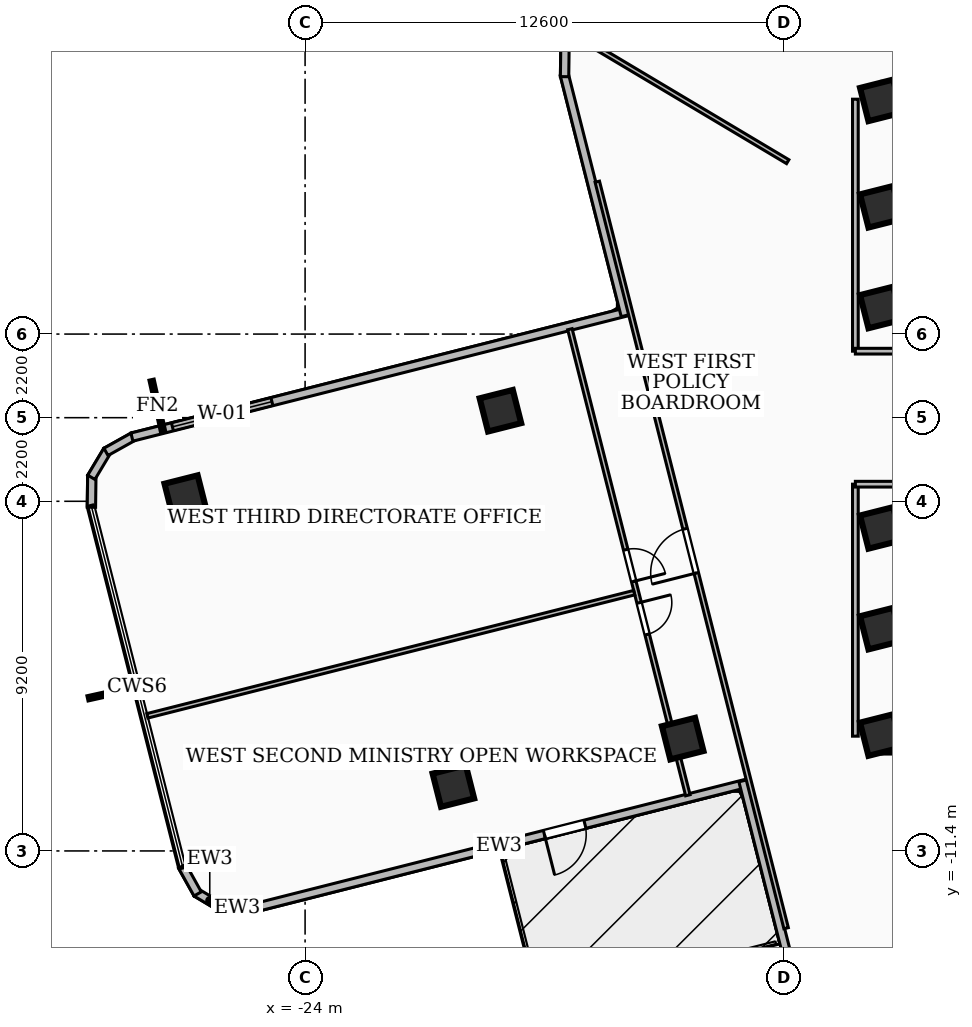
"""IFC4 building model, lengths in metres.
Left out: names, types, materials, properties, quantities, classifications, styles, units other than length and angle.
Written with IfcOpenShell. Run it as: python <this file> out.ifc"""

import sys

from ifc_helpers import new_model, si_unit, direction, frame, frame_2d, origin, origin_2d, place, context, subcontext, project, spatial, rectangle, extrude, element, fill, save


model = new_model("IFC4")
c1 = context("Model", 3, precision=1e-05, world=origin(), true_north=direction((0.0, 1.0)))
c2 = subcontext(c1, "Body", "Model", "MODEL_VIEW")
j1 = project(units=[si_unit("LENGTHUNIT", "METRE"), si_unit("PLANEANGLEUNIT", "RADIAN")], contexts=[c1])
p1 = place(None, origin())
s1 = spatial("IfcSite", under=j1, at=p1, CompositionType="ELEMENT")
p2 = place(p1, origin())
s2 = spatial("IfcBuilding", under=s1, at=p2, CompositionType="ELEMENT")
p3 = place(p2, frame((0.0, 0.0, 127.08)))
s3 = spatial("IfcBuildingStorey", under=s2, at=p3, CompositionType="ELEMENT", Elevation=127.08)
for number, where, z_axis, x_axis in (
    (1, (-8.78, 8.56, 0.0), (0.0, 0.0, 1.0), (1.0, 0.0, 0.0)),
    (2, (8.78, -8.56, 0.0), (0.0, 0.0, 1.0), (-1.0, 0.0, 0.0)),
):
    element("IfcWall", number, at=place(p3, frame(where, z_axis=z_axis, x_axis=x_axis)), inside=s3, PredefinedType="SHEAR", context=c2, shape_type="SweptSolid", body=[
        extrude(rectangle(XDim=17.56, YDim=0.5, at=frame_2d((8.78, 0.0))), origin(), (0.0, 0.0, 1.0), 3.34),
    ])
for number, where, z_axis, x_axis in (
    (3, (-8.85, -5.55, 0.0), (0.0, 0.0, 1.0), (0.969, 0.245, 0.0)),
    (4, (-8.85, -2.9, 0.0), (0.0, 0.0, 1.0), (0.969, 0.245, 0.0)),
    (5, (-8.85, 2.9, 0.0), (0.0, 0.0, 1.0), (0.969, 0.245, 0.0)),
    (6, (-8.85, 5.55, 0.0), (0.0, 0.0, 1.0), (0.969, 0.245, 0.0)),
    (7, (-8.85, 8.35, 0.0), (0.0, 0.0, 1.0), (0.969, 0.245, 0.0)),
    (8, (-8.85, -8.35, 0.0), (0.0, 0.0, 1.0), (0.969, 0.245, 0.0)),
    (9, (-18.86, 0.183, 0.0), (0.0, 0.0, 1.0), (0.969, 0.245, 0.0)),
    (10, (-14.064, -8.445, 0.0), (0.0, 0.0, 1.0), (0.969, 0.245, 0.0)),
    (11, (-27.153, -2.064, 0.0), (0.0, 0.0, 1.0), (0.969, 0.245, 0.0)),
    (12, (-20.098, -9.692, 0.0), (0.0, 0.0, 1.0), (0.969, 0.245, 0.0)),
):
    element("IfcColumn", number, at=place(p3, frame(where, z_axis=z_axis, x_axis=x_axis)), inside=s3, PredefinedType="COLUMN", context=c2, shape_type="SweptSolid", body=[
        extrude(rectangle(XDim=0.9, YDim=0.9, at=origin_2d()), origin(), (0.0, 0.0, 1.0), 3.6),
    ])
p4 = place(p3, frame((-12.371, -9.618, 0.0), z_axis=(0.0, 0.0, 1.0), x_axis=(-0.969434127448, -0.245351732293, 0.0)))
e13 = element("IfcWall", 13, at=p4, inside=s3, PredefinedType="SOLIDWALL", context=c2, shape_type="SweptSolid", body=[
    extrude(rectangle(XDim=13.458, YDim=0.22, at=frame_2d((6.729, 0.0))), origin(), (0.0, 0.0, 1.0), 2.644),
])
p5 = place(p4, frame((4.4, 0.0, 0.0)))
e14 = element("IfcOpeningElement", 14, at=p5, cuts=e13, PredefinedType="OPENING", context=c2, shape_type="SweptSolid", body=[
    extrude(rectangle(XDim=1.1, YDim=2.1, at=frame_2d((0.55, 1.05))), frame((0.0, 0.12, 0.0), z_axis=(0.0, -1.0, 0.0), x_axis=(1.0, 0.0, 0.0)), (0.0, 0.0, 1.0), 0.24),
])
p6 = place(p3, frame((-25.369, -12.914, 0.0), z_axis=(0.0, 0.0, 1.0), x_axis=(-0.999913243347, 0.013172159236, 0.0)))
e15 = element("IfcWall", 15, at=p6, inside=s3, PredefinedType="SOLIDWALL", context=c2, shape_type="SweptSolid", body=[
    extrude(rectangle(XDim=0.834, YDim=0.22, at=frame_2d((0.417, 0.0))), origin(), (0.0, 0.0, 1.0), 3.34),
])
p7 = place(p3, frame((-26.157, -12.916, 0.0), z_axis=(0.0, 0.0, 1.0), x_axis=(-0.858543269067, 0.512741119026, 0.0)))
e16 = element("IfcWall", 16, at=p7, inside=s3, PredefinedType="SOLIDWALL", context=c2, shape_type="SweptSolid", body=[
    extrude(rectangle(XDim=0.819, YDim=0.22, at=frame_2d((0.41, 0.0))), origin(), (0.0, 0.0, 1.0), 3.34),
])
p8 = place(p3, frame((-26.827, -12.531, 0.0), z_axis=(0.0, 0.0, 1.0), x_axis=(-0.486561807946, 0.873646156661, 0.0)))
e17 = element("IfcWall", 17, at=p8, inside=s3, PredefinedType="SOLIDWALL", context=c2, shape_type="SweptSolid", body=[
    extrude(rectangle(XDim=0.834, YDim=0.22, at=frame_2d((0.417, 0.0))), origin(), (0.0, 0.0, 1.0), 3.34),
])
p9 = place(p3, frame((-29.623, -2.357, 0.0), z_axis=(0.0, 0.0, 1.0), x_axis=(0.013172159236, 0.999913243347, 0.0)))
e18 = element("IfcWall", 18, at=p9, inside=s3, PredefinedType="SOLIDWALL", context=c2, shape_type="SweptSolid", body=[
    extrude(rectangle(XDim=0.834, YDim=0.22, at=frame_2d((0.417, 0.0))), origin(), (0.0, 0.0, 1.0), 3.34),
])
p10 = place(p3, frame((-29.625, -1.569, 0.0), z_axis=(0.0, 0.0, 1.0), x_axis=(0.513266477087, 0.858229295409, 0.0)))
e19 = element("IfcWall", 19, at=p10, inside=s3, PredefinedType="SOLIDWALL", context=c2, shape_type="SweptSolid", body=[
    extrude(rectangle(XDim=0.818, YDim=0.22, at=frame_2d((0.409, 0.0))), origin(), (0.0, 0.0, 1.0), 3.34),
])
p11 = place(p3, frame((-29.24, -0.9, 0.0), z_axis=(0.0, 0.0, 1.0), x_axis=(0.873148499647, 0.487454303052, 0.0)))
e20 = element("IfcWall", 20, at=p11, inside=s3, PredefinedType="SOLIDWALL", context=c2, shape_type="SweptSolid", body=[
    extrude(rectangle(XDim=0.835, YDim=0.22, at=frame_2d((0.417, 0.0))), origin(), (0.0, 0.0, 1.0), 3.34),
])
p12 = place(p3, frame((-28.557, -0.511, 0.0), z_axis=(0.0, 0.0, 1.0), x_axis=(0.969429758912, 0.245368992613, 0.0)))
e21 = element("IfcWall", 21, at=p12, inside=s3, PredefinedType="SOLIDWALL", context=c2, shape_type="SweptSolid", body=[
    extrude(rectangle(XDim=13.457, YDim=0.22, at=frame_2d((6.729, 0.0))), origin(), (0.0, 0.0, 1.0), 3.34),
])
p13 = place(p12, frame((1.1, 0.0, 0.85)))
e22 = element("IfcOpeningElement", 22, at=p13, cuts=e21, PredefinedType="OPENING", context=c2, shape_type="SweptSolid", body=[
    extrude(rectangle(XDim=2.7, YDim=2.1, at=frame_2d((1.35, 1.05))), frame((0.0, 0.12, 0.0), z_axis=(0.0, -1.0, 0.0), x_axis=(1.0, 0.0, 0.0)), (0.0, 0.0, 1.0), 0.24),
])
p14 = place(p3, frame((-15.574, 2.684, 0.0), z_axis=(0.0, 0.0, 1.0), x_axis=(-0.245346347134, 0.969435490349, 0.0)))
e23 = element("IfcWall", 23, at=p14, inside=s3, PredefinedType="SOLIDWALL", context=c2, shape_type="SweptSolid", body=[
    extrude(rectangle(XDim=6.538, YDim=0.22, at=frame_2d((3.269, 0.0))), origin(), (0.0, 0.0, 1.0), 3.34),
])
p15 = place(p3, frame((-17.172, 8.973, 0.0), z_axis=(0.0, 0.0, 1.0), x_axis=(0.013464821393, 0.999909345183, 0.0)))
e24 = element("IfcWall", 24, at=p15, inside=s3, PredefinedType="SOLIDWALL", context=c2, shape_type="SweptSolid", body=[
    extrude(rectangle(XDim=0.834, YDim=0.22, at=frame_2d((0.417, 0.0))), origin(), (0.0, 0.0, 1.0), 3.34),
])
p16 = place(p3, frame((-10.82, -16.107, 0.0), z_axis=(0.0, 0.0, 1.0), x_axis=(-0.245314006561, 0.969443674581, 0.0)))
e25 = element("IfcWall", 25, at=p16, inside=s3, PredefinedType="SOLIDWALL", context=c2, shape_type="SweptSolid", body=[
    extrude(rectangle(XDim=6.759, YDim=0.22, at=frame_2d((3.379, 0.0))), origin(), (0.0, 0.0, 1.0), 2.644),
])
p17 = place(p3, frame((-9.52, 1.75, 0.0), z_axis=(0.0, 0.0, 1.0), x_axis=(0.0, 1.0, 0.0)))
e26 = element("IfcWall", 26, at=p17, inside=s3, PredefinedType="PARTITIONING", context=c2, shape_type="SweptSolid", body=[
    extrude(rectangle(XDim=6.63, YDim=0.15, at=frame_2d((3.315, 0.0))), origin(), (0.0, 0.0, 1.0), 2.57),
])
p18 = place(p3, frame((-7.85, 1.75, 0.0), z_axis=(0.0, 0.0, 1.0), x_axis=(-1.0, 0.0, 0.0)))
e27 = element("IfcWall", 27, at=p18, inside=s3, PredefinedType="PARTITIONING", context=c2, shape_type="SweptSolid", body=[
    extrude(rectangle(XDim=1.67, YDim=0.15, at=frame_2d((0.835, 0.0))), origin(), (0.0, 0.0, 1.0), 2.57),
])
p19 = place(p3, frame((-9.52, -8.38, 0.0), z_axis=(0.0, 0.0, 1.0), x_axis=(0.0, 1.0, 0.0)))
e28 = element("IfcWall", 28, at=p19, inside=s3, PredefinedType="PARTITIONING", context=c2, shape_type="SweptSolid", body=[
    extrude(rectangle(XDim=6.63, YDim=0.15, at=frame_2d((3.315, 0.0))), origin(), (0.0, 0.0, 1.0), 2.57),
])
p20 = place(p3, frame((-7.85, -1.75, 0.0), z_axis=(0.0, 0.0, 1.0), x_axis=(-1.0, 0.0, 0.0)))
e29 = element("IfcWall", 29, at=p20, inside=s3, PredefinedType="PARTITIONING", context=c2, shape_type="SweptSolid", body=[
    extrude(rectangle(XDim=1.67, YDim=0.15, at=frame_2d((0.835, 0.0))), origin(), (0.0, 0.0, 1.0), 2.57),
])
p21 = place(p3, frame((-11.3, 6.736, 0.0), z_axis=(0.0, 0.0, 1.0), x_axis=(-0.858979599017, 0.512009812868, 0.0)))
e30 = element("IfcWall", 30, at=p21, inside=s3, PredefinedType="PARTITIONING", context=c2, shape_type="SweptSolid", body=[
    extrude(rectangle(XDim=6.519, YDim=0.12, at=frame_2d((3.26, 0.0))), origin(), (0.0, 0.0, 1.0), 3.34),
])
p22 = place(p3, frame((-6.188, -10.38, 0.0), z_axis=(0.0, 0.0, 1.0), x_axis=(-0.511972353143, -0.859001926434, 0.0)))
e31 = element("IfcWall", 31, at=p22, inside=s3, PredefinedType="PARTITIONING", context=c2, shape_type="SweptSolid", body=[
    extrude(rectangle(XDim=7.59, YDim=0.12, at=frame_2d((3.795, 0.0))), origin(), (0.0, 0.0, 1.0), 2.57),
])
p23 = place(p3, frame((-11.342, -13.433, 0.0), z_axis=(0.0, 0.0, 1.0), x_axis=(-0.24525085526, 0.969459652587, 0.0)))
e32 = element("IfcWall", 32, at=p23, inside=s3, PredefinedType="PARTITIONING", context=c2, shape_type="SweptSolid", body=[
    extrude(rectangle(XDim=20.261, YDim=0.12, at=frame_2d((10.13, 0.0))), origin(), (0.0, 0.0, 1.0), 2.57),
])
p24 = place(p23, frame((9.64, 0.0, 0.0)))
e33 = element("IfcOpeningElement", 33, at=p24, cuts=e32, PredefinedType="OPENING", context=c2, shape_type="SweptSolid", body=[
    extrude(rectangle(XDim=1.2, YDim=2.1, at=frame_2d((0.6, 1.05))), frame((0.0, 0.07, 0.0), z_axis=(0.0, -1.0, 0.0), x_axis=(1.0, 0.0, 0.0)), (0.0, 0.0, 1.0), 0.14),
])
p25 = place(p3, frame((-15.339, -4.604, 0.0), z_axis=(0.0, 0.0, 1.0), x_axis=(-0.969461701565, -0.245242755651, 0.0)))
e34 = element("IfcWall", 34, at=p25, inside=s3, PredefinedType="PARTITIONING", context=c2, shape_type="SweptSolid", body=[
    extrude(rectangle(XDim=13.215, YDim=0.12, at=frame_2d((6.608, 0.0))), origin(), (0.0, 0.0, 1.0), 2.72),
])
p26 = place(p3, frame((-17.032, 2.328, 0.0), z_axis=(0.0, 0.0, 1.0), x_axis=(0.245381918011, -0.969426487318, 0.0)))
e35 = element("IfcWall", 35, at=p26, inside=s3, PredefinedType="PARTITIONING", context=c2, shape_type="SweptSolid", body=[
    extrude(rectangle(XDim=12.65, YDim=0.12, at=frame_2d((6.325, 0.0))), origin(), (0.0, 0.0, 1.0), 2.57),
])
p27 = place(p26, frame((5.985, 0.0, 0.0)))
e36 = element("IfcOpeningElement", 36, at=p27, cuts=e35, PredefinedType="OPENING", context=c2, shape_type="SweptSolid", body=[
    extrude(rectangle(XDim=0.86, YDim=2.04, at=frame_2d((0.43, 1.02))), frame((0.0, 0.07, 0.0), z_axis=(0.0, -1.0, 0.0), x_axis=(1.0, 0.0, 0.0)), (0.0, 0.0, 1.0), 0.14),
])
p28 = place(p26, frame((7.425, 0.0, 0.0)))
e37 = element("IfcOpeningElement", 37, at=p28, cuts=e35, PredefinedType="OPENING", context=c2, shape_type="SweptSolid", body=[
    extrude(rectangle(XDim=0.86, YDim=2.04, at=frame_2d((0.43, 1.02))), frame((0.0, 0.07, 0.0), z_axis=(0.0, -1.0, 0.0), x_axis=(1.0, 0.0, 0.0)), (0.0, 0.0, 1.0), 0.14),
])
p29 = place(p5, origin())
e38 = element("IfcDoor", 38, at=p29, inside=s3, OperationType="SINGLE_SWING_RIGHT", PredefinedType="DOOR", context=c2, shape_type="SweptSolid", body=[
    extrude(rectangle(XDim=1.1, YDim=2.1, at=frame_2d((0.55, 1.05))), frame((0.0, 0.025, 0.0), z_axis=(0.0, -1.0, 0.0), x_axis=(1.0, 0.0, 0.0)), (0.0, 0.0, 1.0), 0.05),
])
fill(e14, e38)
p30 = place(p13, origin())
e39 = element("IfcWindow", 39, at=p30, inside=s3, PartitioningType="SINGLE_PANEL", PredefinedType="WINDOW", context=c2, shape_type="SweptSolid", body=[
    extrude(rectangle(XDim=2.7, YDim=2.1, at=frame_2d((1.35, 1.05))), frame((0.0, 0.03, 0.0), z_axis=(0.0, -1.0, 0.0), x_axis=(1.0, 0.0, 0.0)), (0.0, 0.0, 1.0), 0.06),
])
fill(e22, e39)
p31 = place(p24, origin())
e40 = element("IfcDoor", 40, at=p31, inside=s3, OperationType="SINGLE_SWING_LEFT", PredefinedType="DOOR", context=c2, shape_type="SweptSolid", body=[
    extrude(rectangle(XDim=1.2, YDim=2.1, at=frame_2d((0.6, 1.05))), frame((0.0, 0.025, 0.0), z_axis=(0.0, -1.0, 0.0), x_axis=(1.0, 0.0, 0.0)), (0.0, 0.0, 1.0), 0.05),
])
fill(e33, e40)
p32 = place(p27, origin())
e41 = element("IfcDoor", 41, at=p32, inside=s3, OperationType="SINGLE_SWING_RIGHT", PredefinedType="DOOR", context=c2, shape_type="SweptSolid", body=[
    extrude(rectangle(XDim=0.86, YDim=2.04, at=frame_2d((0.43, 1.02))), frame((0.0, 0.025, 0.0), z_axis=(0.0, -1.0, 0.0), x_axis=(1.0, 0.0, 0.0)), (0.0, 0.0, 1.0), 0.05),
])
fill(e36, e41)
p33 = place(p28, origin())
e42 = element("IfcDoor", 42, at=p33, inside=s3, OperationType="SINGLE_SWING_LEFT", PredefinedType="DOOR", context=c2, shape_type="SweptSolid", body=[
    extrude(rectangle(XDim=0.86, YDim=2.04, at=frame_2d((0.43, 1.02))), frame((0.0, 0.025, 0.0), z_axis=(0.0, -1.0, 0.0), x_axis=(1.0, 0.0, 0.0)), (0.0, 0.0, 1.0), 0.05),
])
fill(e37, e42)
save(model, sys.argv[1])
